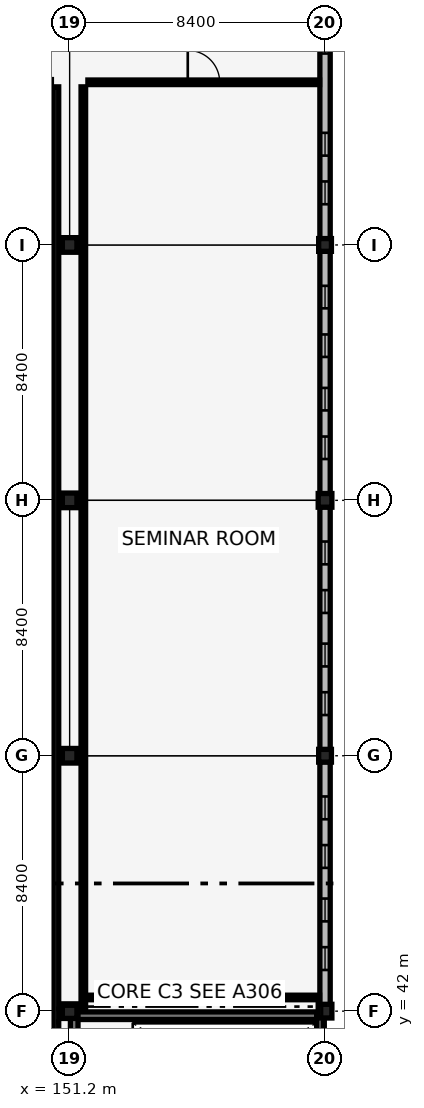
"""IFC4 building model, lengths in metres.
Left out: names, types, materials, properties, quantities, classifications, styles, units other than length and angle.
Written with IfcOpenShell. Run it as: python <this file> out.ifc"""

import sys

from ifc_helpers import new_model, si_unit, direction, frame, frame_2d, origin, origin_2d, place, context, subcontext, project, spatial, rectangle, extrude, element, fill, save


model = new_model("IFC4")
c1 = context("Model", 3, precision=1e-05, world=origin(), true_north=direction((0.0, 1.0)))
c2 = subcontext(c1, "Body", "Model", "MODEL_VIEW")
j1 = project(units=[si_unit("LENGTHUNIT", "METRE"), si_unit("PLANEANGLEUNIT", "RADIAN")], contexts=[c1])
p1 = place(None, origin())
s1 = spatial("IfcSite", under=j1, at=p1, CompositionType="ELEMENT")
p2 = place(p1, origin())
s2 = spatial("IfcBuilding", under=s1, at=p2, CompositionType="ELEMENT")
p3 = place(p2, frame((0.0, 0.0, 26.18)))
s3 = spatial("IfcBuildingStorey", under=s2, at=p3, CompositionType="ELEMENT", Elevation=26.18)
p4 = place(p3, frame((151.35, 41.85, 0.0), z_axis=(0.0, 0.0, 1.0), x_axis=(1.0, 0.0, 0.0)))
e1 = element("IfcWall", 1, at=p4, inside=s3, PredefinedType="SHEAR", context=c2, shape_type="SweptSolid", body=[
    extrude(rectangle(XDim=8.1, YDim=0.25, at=frame_2d((4.05, 0.0))), origin(), (0.0, 0.0, 1.0), 3.84),
])
p5 = place(p3, frame((151.35, 33.75, 0.0), z_axis=(0.0, 0.0, 1.0), x_axis=(0.0, 1.0, 0.0)))
e2 = element("IfcWall", 2, at=p5, inside=s3, PredefinedType="SHEAR", context=c2, shape_type="SweptSolid", body=[
    extrude(rectangle(XDim=8.1, YDim=0.25, at=frame_2d((4.05, 0.0))), origin(), (0.0, 0.0, 1.0), 3.84),
])
p6 = place(p5, frame((1.325, 0.0, 0.0)))
e3 = element("IfcOpeningElement", 3, at=p6, cuts=e2, PredefinedType="OPENING", context=c2, shape_type="SweptSolid", body=[
    extrude(rectangle(XDim=1.45, YDim=2.15, at=frame_2d((0.725, 1.075))), frame((0.0, 0.135, 0.0), z_axis=(0.0, -1.0, 0.0), x_axis=(1.0, 0.0, 0.0)), (0.0, 0.0, 1.0), 0.27),
])
p7 = place(p3, frame((159.45, 33.75, 0.0), z_axis=(0.0, 0.0, 1.0), x_axis=(0.0, 1.0, 0.0)))
e4 = element("IfcWall", 4, at=p7, inside=s3, PredefinedType="SHEAR", context=c2, shape_type="SweptSolid", body=[
    extrude(rectangle(XDim=8.1, YDim=0.25, at=frame_2d((4.05, 0.0))), origin(), (0.0, 0.0, 1.0), 3.84),
])
for number, where, z_axis, x_axis in (
    (5, (151.2, 42.0, 0.0), (0.0, 0.0, 1.0), (1.0, 0.0, 0.0)),
    (6, (151.2, 50.4, 0.0), (0.0, 0.0, 1.0), (1.0, 0.0, 0.0)),
    (7, (151.2, 58.8, 0.0), (0.0, 0.0, 1.0), (1.0, 0.0, 0.0)),
    (8, (151.2, 67.2, 0.0), (0.0, 0.0, 1.0), (1.0, 0.0, 0.0)),
):
    element("IfcColumn", number, at=place(p3, frame(where, z_axis=z_axis, x_axis=x_axis)), inside=s3, PredefinedType="COLUMN", context=c2, shape_type="SweptSolid", body=[
        extrude(rectangle(XDim=0.48, YDim=0.48, at=origin_2d()), origin(), (0.0, 0.0, 1.0), 3.84),
    ])
p8 = place(p3, frame((159.6, 42.0, 0.0), z_axis=(0.0, 0.0, 1.0), x_axis=(1.0, 0.0, 0.0)))
e9 = element("IfcColumn", 9, at=p8, inside=s3, PredefinedType="COLUMN", context=c2, shape_type="SweptSolid", body=[
    extrude(rectangle(XDim=0.45, YDim=0.45, at=origin_2d()), origin(), (0.0, 0.0, 1.0), 3.84),
])
p9 = place(p3, frame((159.6, 50.4, 0.0), z_axis=(0.0, 0.0, 1.0), x_axis=(1.0, 0.0, 0.0)))
e10 = element("IfcColumn", 10, at=p9, inside=s3, PredefinedType="COLUMN", context=c2, shape_type="SweptSolid", body=[
    extrude(rectangle(XDim=0.42, YDim=0.42, at=origin_2d()), origin(), (0.0, 0.0, 1.0), 3.84),
])
p10 = place(p3, frame((159.6, 58.8, 0.0), z_axis=(0.0, 0.0, 1.0), x_axis=(1.0, 0.0, 0.0)))
e11 = element("IfcColumn", 11, at=p10, inside=s3, PredefinedType="COLUMN", context=c2, shape_type="SweptSolid", body=[
    extrude(rectangle(XDim=0.45, YDim=0.45, at=origin_2d()), origin(), (0.0, 0.0, 1.0), 3.84),
])
p11 = place(p3, frame((159.6, 67.2, 0.0), z_axis=(0.0, 0.0, 1.0), x_axis=(1.0, 0.0, 0.0)))
e12 = element("IfcColumn", 12, at=p11, inside=s3, PredefinedType="COLUMN", context=c2, shape_type="SweptSolid", body=[
    extrude(rectangle(XDim=0.42, YDim=0.42, at=origin_2d()), origin(), (0.0, 0.0, 1.0), 3.84),
])
p12 = place(p3, frame((159.6, 42.21, 0.0), z_axis=(0.0, 0.0, 1.0), x_axis=(0.0, 1.0, 0.0)))
e13 = element("IfcWall", 13, at=p12, inside=s3, PredefinedType="SOLIDWALL", context=c2, shape_type="SweptSolid", body=[
    extrude(rectangle(XDim=7.995, YDim=0.34, at=frame_2d((3.998, 0.0))), origin(), (0.0, 0.0, 1.0), 3.48),
])
p13 = place(p12, frame((1.144, 0.0, 0.75)))
e14 = element("IfcOpeningElement", 14, at=p13, cuts=e13, PredefinedType="OPENING", context=c2, shape_type="SweptSolid", body=[
    extrude(rectangle(XDim=0.75, YDim=2.1, at=frame_2d((0.375, 1.05))), frame((0.0, 0.18, 0.0), z_axis=(0.0, -1.0, 0.0), x_axis=(1.0, 0.0, 0.0)), (0.0, 0.0, 1.0), 0.36),
])
p14 = place(p12, frame((2.743, 0.0, 0.75)))
e15 = element("IfcOpeningElement", 15, at=p14, cuts=e13, PredefinedType="OPENING", context=c2, shape_type="SweptSolid", body=[
    extrude(rectangle(XDim=0.75, YDim=2.1, at=frame_2d((0.375, 1.05))), frame((0.0, 0.18, 0.0), z_axis=(0.0, -1.0, 0.0), x_axis=(1.0, 0.0, 0.0)), (0.0, 0.0, 1.0), 0.36),
])
p15 = place(p12, frame((4.502, 0.0, 0.75)))
e16 = element("IfcOpeningElement", 16, at=p15, cuts=e13, PredefinedType="OPENING", context=c2, shape_type="SweptSolid", body=[
    extrude(rectangle(XDim=0.75, YDim=2.1, at=frame_2d((0.375, 1.05))), frame((0.0, 0.18, 0.0), z_axis=(0.0, -1.0, 0.0), x_axis=(1.0, 0.0, 0.0)), (0.0, 0.0, 1.0), 0.36),
])
p16 = place(p12, frame((6.101, 0.0, 0.75)))
e17 = element("IfcOpeningElement", 17, at=p16, cuts=e13, PredefinedType="OPENING", context=c2, shape_type="SweptSolid", body=[
    extrude(rectangle(XDim=0.75, YDim=2.1, at=frame_2d((0.375, 1.05))), frame((0.0, 0.18, 0.0), z_axis=(0.0, -1.0, 0.0), x_axis=(1.0, 0.0, 0.0)), (0.0, 0.0, 1.0), 0.36),
])
p17 = place(p3, frame((159.6, 50.595, 0.0), z_axis=(0.0, 0.0, 1.0), x_axis=(0.0, 1.0, 0.0)))
e18 = element("IfcWall", 18, at=p17, inside=s3, PredefinedType="SOLIDWALL", context=c2, shape_type="SweptSolid", body=[
    extrude(rectangle(XDim=7.995, YDim=0.34, at=frame_2d((3.998, 0.0))), origin(), (0.0, 0.0, 1.0), 3.48),
])
p18 = place(p17, frame((1.144, 0.0, 0.75)))
e19 = element("IfcOpeningElement", 19, at=p18, cuts=e18, PredefinedType="OPENING", context=c2, shape_type="SweptSolid", body=[
    extrude(rectangle(XDim=0.75, YDim=2.1, at=frame_2d((0.375, 1.05))), frame((0.0, 0.18, 0.0), z_axis=(0.0, -1.0, 0.0), x_axis=(1.0, 0.0, 0.0)), (0.0, 0.0, 1.0), 0.36),
])
p19 = place(p17, frame((2.743, 0.0, 0.75)))
e20 = element("IfcOpeningElement", 20, at=p19, cuts=e18, PredefinedType="OPENING", context=c2, shape_type="SweptSolid", body=[
    extrude(rectangle(XDim=0.75, YDim=2.1, at=frame_2d((0.375, 1.05))), frame((0.0, 0.18, 0.0), z_axis=(0.0, -1.0, 0.0), x_axis=(1.0, 0.0, 0.0)), (0.0, 0.0, 1.0), 0.36),
])
p20 = place(p17, frame((4.502, 0.0, 0.75)))
e21 = element("IfcOpeningElement", 21, at=p20, cuts=e18, PredefinedType="OPENING", context=c2, shape_type="SweptSolid", body=[
    extrude(rectangle(XDim=0.75, YDim=2.1, at=frame_2d((0.375, 1.05))), frame((0.0, 0.18, 0.0), z_axis=(0.0, -1.0, 0.0), x_axis=(1.0, 0.0, 0.0)), (0.0, 0.0, 1.0), 0.36),
])
p21 = place(p17, frame((6.101, 0.0, 0.75)))
e22 = element("IfcOpeningElement", 22, at=p21, cuts=e18, PredefinedType="OPENING", context=c2, shape_type="SweptSolid", body=[
    extrude(rectangle(XDim=0.75, YDim=2.1, at=frame_2d((0.375, 1.05))), frame((0.0, 0.18, 0.0), z_axis=(0.0, -1.0, 0.0), x_axis=(1.0, 0.0, 0.0)), (0.0, 0.0, 1.0), 0.36),
])
p22 = place(p3, frame((159.6, 59.01, 0.0), z_axis=(0.0, 0.0, 1.0), x_axis=(0.0, 1.0, 0.0)))
e23 = element("IfcWall", 23, at=p22, inside=s3, PredefinedType="SOLIDWALL", context=c2, shape_type="SweptSolid", body=[
    extrude(rectangle(XDim=7.995, YDim=0.34, at=frame_2d((3.998, 0.0))), origin(), (0.0, 0.0, 1.0), 3.48),
])
p23 = place(p22, frame((1.149, 0.0, 0.75)))
e24 = element("IfcOpeningElement", 24, at=p23, cuts=e23, PredefinedType="OPENING", context=c2, shape_type="SweptSolid", body=[
    extrude(rectangle(XDim=0.74, YDim=2.3, at=frame_2d((0.37, 1.15))), frame((0.0, 0.18, 0.0), z_axis=(0.0, -1.0, 0.0), x_axis=(1.0, 0.0, 0.0)), (0.0, 0.0, 1.0), 0.36),
])
p24 = place(p22, frame((2.748, 0.0, 0.75)))
e25 = element("IfcOpeningElement", 25, at=p24, cuts=e23, PredefinedType="OPENING", context=c2, shape_type="SweptSolid", body=[
    extrude(rectangle(XDim=0.74, YDim=2.3, at=frame_2d((0.37, 1.15))), frame((0.0, 0.18, 0.0), z_axis=(0.0, -1.0, 0.0), x_axis=(1.0, 0.0, 0.0)), (0.0, 0.0, 1.0), 0.36),
])
p25 = place(p22, frame((4.507, 0.0, 0.75)))
e26 = element("IfcOpeningElement", 26, at=p25, cuts=e23, PredefinedType="OPENING", context=c2, shape_type="SweptSolid", body=[
    extrude(rectangle(XDim=0.74, YDim=2.3, at=frame_2d((0.37, 1.15))), frame((0.0, 0.18, 0.0), z_axis=(0.0, -1.0, 0.0), x_axis=(1.0, 0.0, 0.0)), (0.0, 0.0, 1.0), 0.36),
])
p26 = place(p22, frame((6.106, 0.0, 0.75)))
e27 = element("IfcOpeningElement", 27, at=p26, cuts=e23, PredefinedType="OPENING", context=c2, shape_type="SweptSolid", body=[
    extrude(rectangle(XDim=0.74, YDim=2.3, at=frame_2d((0.37, 1.15))), frame((0.0, 0.18, 0.0), z_axis=(0.0, -1.0, 0.0), x_axis=(1.0, 0.0, 0.0)), (0.0, 0.0, 1.0), 0.36),
])
p27 = place(p3, frame((159.6, 67.395, 0.0), z_axis=(0.0, 0.0, 1.0), x_axis=(0.0, 1.0, 0.0)))
e28 = element("IfcWall", 28, at=p27, inside=s3, PredefinedType="SOLIDWALL", context=c2, shape_type="SweptSolid", body=[
    extrude(rectangle(XDim=7.995, YDim=0.34, at=frame_2d((3.998, 0.0))), origin(), (0.0, 0.0, 1.0), 3.48),
])
p28 = place(p27, frame((1.144, 0.0, 0.75)))
e29 = element("IfcOpeningElement", 29, at=p28, cuts=e28, PredefinedType="OPENING", context=c2, shape_type="SweptSolid", body=[
    extrude(rectangle(XDim=0.75, YDim=2.1, at=frame_2d((0.375, 1.05))), frame((0.0, 0.18, 0.0), z_axis=(0.0, -1.0, 0.0), x_axis=(1.0, 0.0, 0.0)), (0.0, 0.0, 1.0), 0.36),
])
p29 = place(p27, frame((2.743, 0.0, 0.75)))
e30 = element("IfcOpeningElement", 30, at=p29, cuts=e28, PredefinedType="OPENING", context=c2, shape_type="SweptSolid", body=[
    extrude(rectangle(XDim=0.75, YDim=2.1, at=frame_2d((0.375, 1.05))), frame((0.0, 0.18, 0.0), z_axis=(0.0, -1.0, 0.0), x_axis=(1.0, 0.0, 0.0)), (0.0, 0.0, 1.0), 0.36),
])
p30 = place(p27, frame((6.101, 0.0, 0.75)))
e31 = element("IfcOpeningElement", 31, at=p30, cuts=e28, PredefinedType="OPENING", context=c2, shape_type="SweptSolid", body=[
    extrude(rectangle(XDim=0.75, YDim=2.1, at=frame_2d((0.375, 1.05))), frame((0.0, 0.18, 0.0), z_axis=(0.0, -1.0, 0.0), x_axis=(1.0, 0.0, 0.0)), (0.0, 0.0, 1.0), 0.36),
])
p31 = place(p3, frame((150.75, 34.2, 0.0), z_axis=(0.0, 0.0, 1.0), x_axis=(0.0, 1.0, 0.0)))
e32 = element("IfcWall", 32, at=p31, inside=s3, PredefinedType="PARTITIONING", context=c2, shape_type="SweptSolid", body=[
    extrude(rectangle(XDim=38.2, YDim=0.18, at=frame_2d((19.1, 0.0))), origin(), (0.0, 0.0, 1.0), 3.84),
])
p32 = place(p3, frame((151.8, 72.55, 0.0), z_axis=(0.0, 0.0, 1.0), x_axis=(1.0, 0.0, 0.0)))
e33 = element("IfcWall", 33, at=p32, inside=s3, PredefinedType="PARTITIONING", context=c2, shape_type="SweptSolid", body=[
    extrude(rectangle(XDim=7.62, YDim=0.15, at=frame_2d((3.81, 0.0))), origin(), (0.0, 0.0, 1.0), 3.48),
])
p33 = place(p32, frame((3.285, 0.0, 0.0)))
e34 = element("IfcOpeningElement", 34, at=p33, cuts=e33, PredefinedType="OPENING", context=c2, shape_type="SweptSolid", body=[
    extrude(rectangle(XDim=1.05, YDim=2.15, at=frame_2d((0.525, 1.075))), frame((0.0, 0.085, 0.0), z_axis=(0.0, -1.0, 0.0), x_axis=(1.0, 0.0, 0.0)), (0.0, 0.0, 1.0), 0.17),
])
p34 = place(p3, frame((151.8, 42.45, 0.0), z_axis=(0.0, 0.0, 1.0), x_axis=(1.0, 0.0, 0.0)))
e35 = element("IfcWall", 35, at=p34, inside=s3, PredefinedType="PARTITIONING", context=c2, shape_type="SweptSolid", body=[
    extrude(rectangle(XDim=7.62, YDim=0.15, at=frame_2d((3.81, 0.0))), origin(), (0.0, 0.0, 1.0), 3.48),
])
p35 = place(p3, frame((151.65, 42.03, 0.0), z_axis=(0.0, 0.0, 1.0), x_axis=(0.0, 1.0, 0.0)))
e36 = element("IfcWall", 36, at=p35, inside=s3, PredefinedType="PARTITIONING", context=c2, shape_type="SweptSolid", body=[
    extrude(rectangle(XDim=30.37, YDim=0.15, at=frame_2d((15.185, 0.0))), origin(), (0.0, 0.0, 1.0), 3.84),
])
p36 = place(p13, origin())
e37 = element("IfcWindow", 37, at=p36, inside=s3, PartitioningType="DOUBLE_PANEL_VERTICAL", PredefinedType="WINDOW", context=c2, shape_type="SweptSolid", body=[
    extrude(rectangle(XDim=0.75, YDim=2.1, at=frame_2d((0.375, 1.05))), frame((0.0, 0.03, 0.0), z_axis=(0.0, -1.0, 0.0), x_axis=(1.0, 0.0, 0.0)), (0.0, 0.0, 1.0), 0.06),
])
fill(e14, e37)
p37 = place(p14, origin())
e38 = element("IfcWindow", 38, at=p37, inside=s3, PartitioningType="DOUBLE_PANEL_VERTICAL", PredefinedType="WINDOW", context=c2, shape_type="SweptSolid", body=[
    extrude(rectangle(XDim=0.75, YDim=2.1, at=frame_2d((0.375, 1.05))), frame((0.0, 0.03, 0.0), z_axis=(0.0, -1.0, 0.0), x_axis=(1.0, 0.0, 0.0)), (0.0, 0.0, 1.0), 0.06),
])
fill(e15, e38)
p38 = place(p15, origin())
e39 = element("IfcWindow", 39, at=p38, inside=s3, PartitioningType="DOUBLE_PANEL_VERTICAL", PredefinedType="WINDOW", context=c2, shape_type="SweptSolid", body=[
    extrude(rectangle(XDim=0.75, YDim=2.1, at=frame_2d((0.375, 1.05))), frame((0.0, 0.03, 0.0), z_axis=(0.0, -1.0, 0.0), x_axis=(1.0, 0.0, 0.0)), (0.0, 0.0, 1.0), 0.06),
])
fill(e16, e39)
p39 = place(p16, origin())
e40 = element("IfcWindow", 40, at=p39, inside=s3, PartitioningType="DOUBLE_PANEL_VERTICAL", PredefinedType="WINDOW", context=c2, shape_type="SweptSolid", body=[
    extrude(rectangle(XDim=0.75, YDim=2.1, at=frame_2d((0.375, 1.05))), frame((0.0, 0.03, 0.0), z_axis=(0.0, -1.0, 0.0), x_axis=(1.0, 0.0, 0.0)), (0.0, 0.0, 1.0), 0.06),
])
fill(e17, e40)
p40 = place(p18, origin())
e41 = element("IfcWindow", 41, at=p40, inside=s3, PartitioningType="DOUBLE_PANEL_VERTICAL", PredefinedType="WINDOW", context=c2, shape_type="SweptSolid", body=[
    extrude(rectangle(XDim=0.75, YDim=2.1, at=frame_2d((0.375, 1.05))), frame((0.0, 0.03, 0.0), z_axis=(0.0, -1.0, 0.0), x_axis=(1.0, 0.0, 0.0)), (0.0, 0.0, 1.0), 0.06),
])
fill(e19, e41)
p41 = place(p19, origin())
e42 = element("IfcWindow", 42, at=p41, inside=s3, PartitioningType="DOUBLE_PANEL_VERTICAL", PredefinedType="WINDOW", context=c2, shape_type="SweptSolid", body=[
    extrude(rectangle(XDim=0.75, YDim=2.1, at=frame_2d((0.375, 1.05))), frame((0.0, 0.03, 0.0), z_axis=(0.0, -1.0, 0.0), x_axis=(1.0, 0.0, 0.0)), (0.0, 0.0, 1.0), 0.06),
])
fill(e20, e42)
p42 = place(p20, origin())
e43 = element("IfcWindow", 43, at=p42, inside=s3, PartitioningType="DOUBLE_PANEL_VERTICAL", PredefinedType="WINDOW", context=c2, shape_type="SweptSolid", body=[
    extrude(rectangle(XDim=0.75, YDim=2.1, at=frame_2d((0.375, 1.05))), frame((0.0, 0.03, 0.0), z_axis=(0.0, -1.0, 0.0), x_axis=(1.0, 0.0, 0.0)), (0.0, 0.0, 1.0), 0.06),
])
fill(e21, e43)
p43 = place(p21, origin())
e44 = element("IfcWindow", 44, at=p43, inside=s3, PartitioningType="DOUBLE_PANEL_VERTICAL", PredefinedType="WINDOW", context=c2, shape_type="SweptSolid", body=[
    extrude(rectangle(XDim=0.75, YDim=2.1, at=frame_2d((0.375, 1.05))), frame((0.0, 0.03, 0.0), z_axis=(0.0, -1.0, 0.0), x_axis=(1.0, 0.0, 0.0)), (0.0, 0.0, 1.0), 0.06),
])
fill(e22, e44)
p44 = place(p23, origin())
e45 = element("IfcWindow", 45, at=p44, inside=s3, PartitioningType="DOUBLE_PANEL_VERTICAL", PredefinedType="WINDOW", context=c2, shape_type="SweptSolid", body=[
    extrude(rectangle(XDim=0.74, YDim=2.3, at=frame_2d((0.37, 1.15))), frame((0.0, 0.03, 0.0), z_axis=(0.0, -1.0, 0.0), x_axis=(1.0, 0.0, 0.0)), (0.0, 0.0, 1.0), 0.06),
])
fill(e24, e45)
p45 = place(p24, origin())
e46 = element("IfcWindow", 46, at=p45, inside=s3, PartitioningType="DOUBLE_PANEL_VERTICAL", PredefinedType="WINDOW", context=c2, shape_type="SweptSolid", body=[
    extrude(rectangle(XDim=0.74, YDim=2.3, at=frame_2d((0.37, 1.15))), frame((0.0, 0.03, 0.0), z_axis=(0.0, -1.0, 0.0), x_axis=(1.0, 0.0, 0.0)), (0.0, 0.0, 1.0), 0.06),
])
fill(e25, e46)
p46 = place(p25, origin())
e47 = element("IfcWindow", 47, at=p46, inside=s3, PartitioningType="DOUBLE_PANEL_VERTICAL", PredefinedType="WINDOW", context=c2, shape_type="SweptSolid", body=[
    extrude(rectangle(XDim=0.74, YDim=2.3, at=frame_2d((0.37, 1.15))), frame((0.0, 0.03, 0.0), z_axis=(0.0, -1.0, 0.0), x_axis=(1.0, 0.0, 0.0)), (0.0, 0.0, 1.0), 0.06),
])
fill(e26, e47)
p47 = place(p26, origin())
e48 = element("IfcWindow", 48, at=p47, inside=s3, PartitioningType="DOUBLE_PANEL_VERTICAL", PredefinedType="WINDOW", context=c2, shape_type="SweptSolid", body=[
    extrude(rectangle(XDim=0.74, YDim=2.3, at=frame_2d((0.37, 1.15))), frame((0.0, 0.03, 0.0), z_axis=(0.0, -1.0, 0.0), x_axis=(1.0, 0.0, 0.0)), (0.0, 0.0, 1.0), 0.06),
])
fill(e27, e48)
p48 = place(p28, origin())
e49 = element("IfcWindow", 49, at=p48, inside=s3, PartitioningType="DOUBLE_PANEL_VERTICAL", PredefinedType="WINDOW", context=c2, shape_type="SweptSolid", body=[
    extrude(rectangle(XDim=0.75, YDim=2.1, at=frame_2d((0.375, 1.05))), frame((0.0, 0.03, 0.0), z_axis=(0.0, -1.0, 0.0), x_axis=(1.0, 0.0, 0.0)), (0.0, 0.0, 1.0), 0.06),
])
fill(e29, e49)
p49 = place(p29, origin())
e50 = element("IfcWindow", 50, at=p49, inside=s3, PartitioningType="DOUBLE_PANEL_VERTICAL", PredefinedType="WINDOW", context=c2, shape_type="SweptSolid", body=[
    extrude(rectangle(XDim=0.75, YDim=2.1, at=frame_2d((0.375, 1.05))), frame((0.0, 0.03, 0.0), z_axis=(0.0, -1.0, 0.0), x_axis=(1.0, 0.0, 0.0)), (0.0, 0.0, 1.0), 0.06),
])
fill(e30, e50)
p50 = place(p30, origin())
e51 = element("IfcWindow", 51, at=p50, inside=s3, PartitioningType="DOUBLE_PANEL_VERTICAL", PredefinedType="WINDOW", context=c2, shape_type="SweptSolid", body=[
    extrude(rectangle(XDim=0.75, YDim=2.1, at=frame_2d((0.375, 1.05))), frame((0.0, 0.03, 0.0), z_axis=(0.0, -1.0, 0.0), x_axis=(1.0, 0.0, 0.0)), (0.0, 0.0, 1.0), 0.06),
])
fill(e31, e51)
p51 = place(p33, origin())
e52 = element("IfcDoor", 52, at=p51, inside=s3, OperationType="SINGLE_SWING_LEFT", PredefinedType="DOOR", context=c2, shape_type="SweptSolid", body=[
    extrude(rectangle(XDim=1.05, YDim=2.15, at=frame_2d((0.525, 1.075))), frame((0.0, 0.025, 0.0), z_axis=(0.0, -1.0, 0.0), x_axis=(1.0, 0.0, 0.0)), (0.0, 0.0, 1.0), 0.05),
])
fill(e34, e52)
save(model, sys.argv[1])
